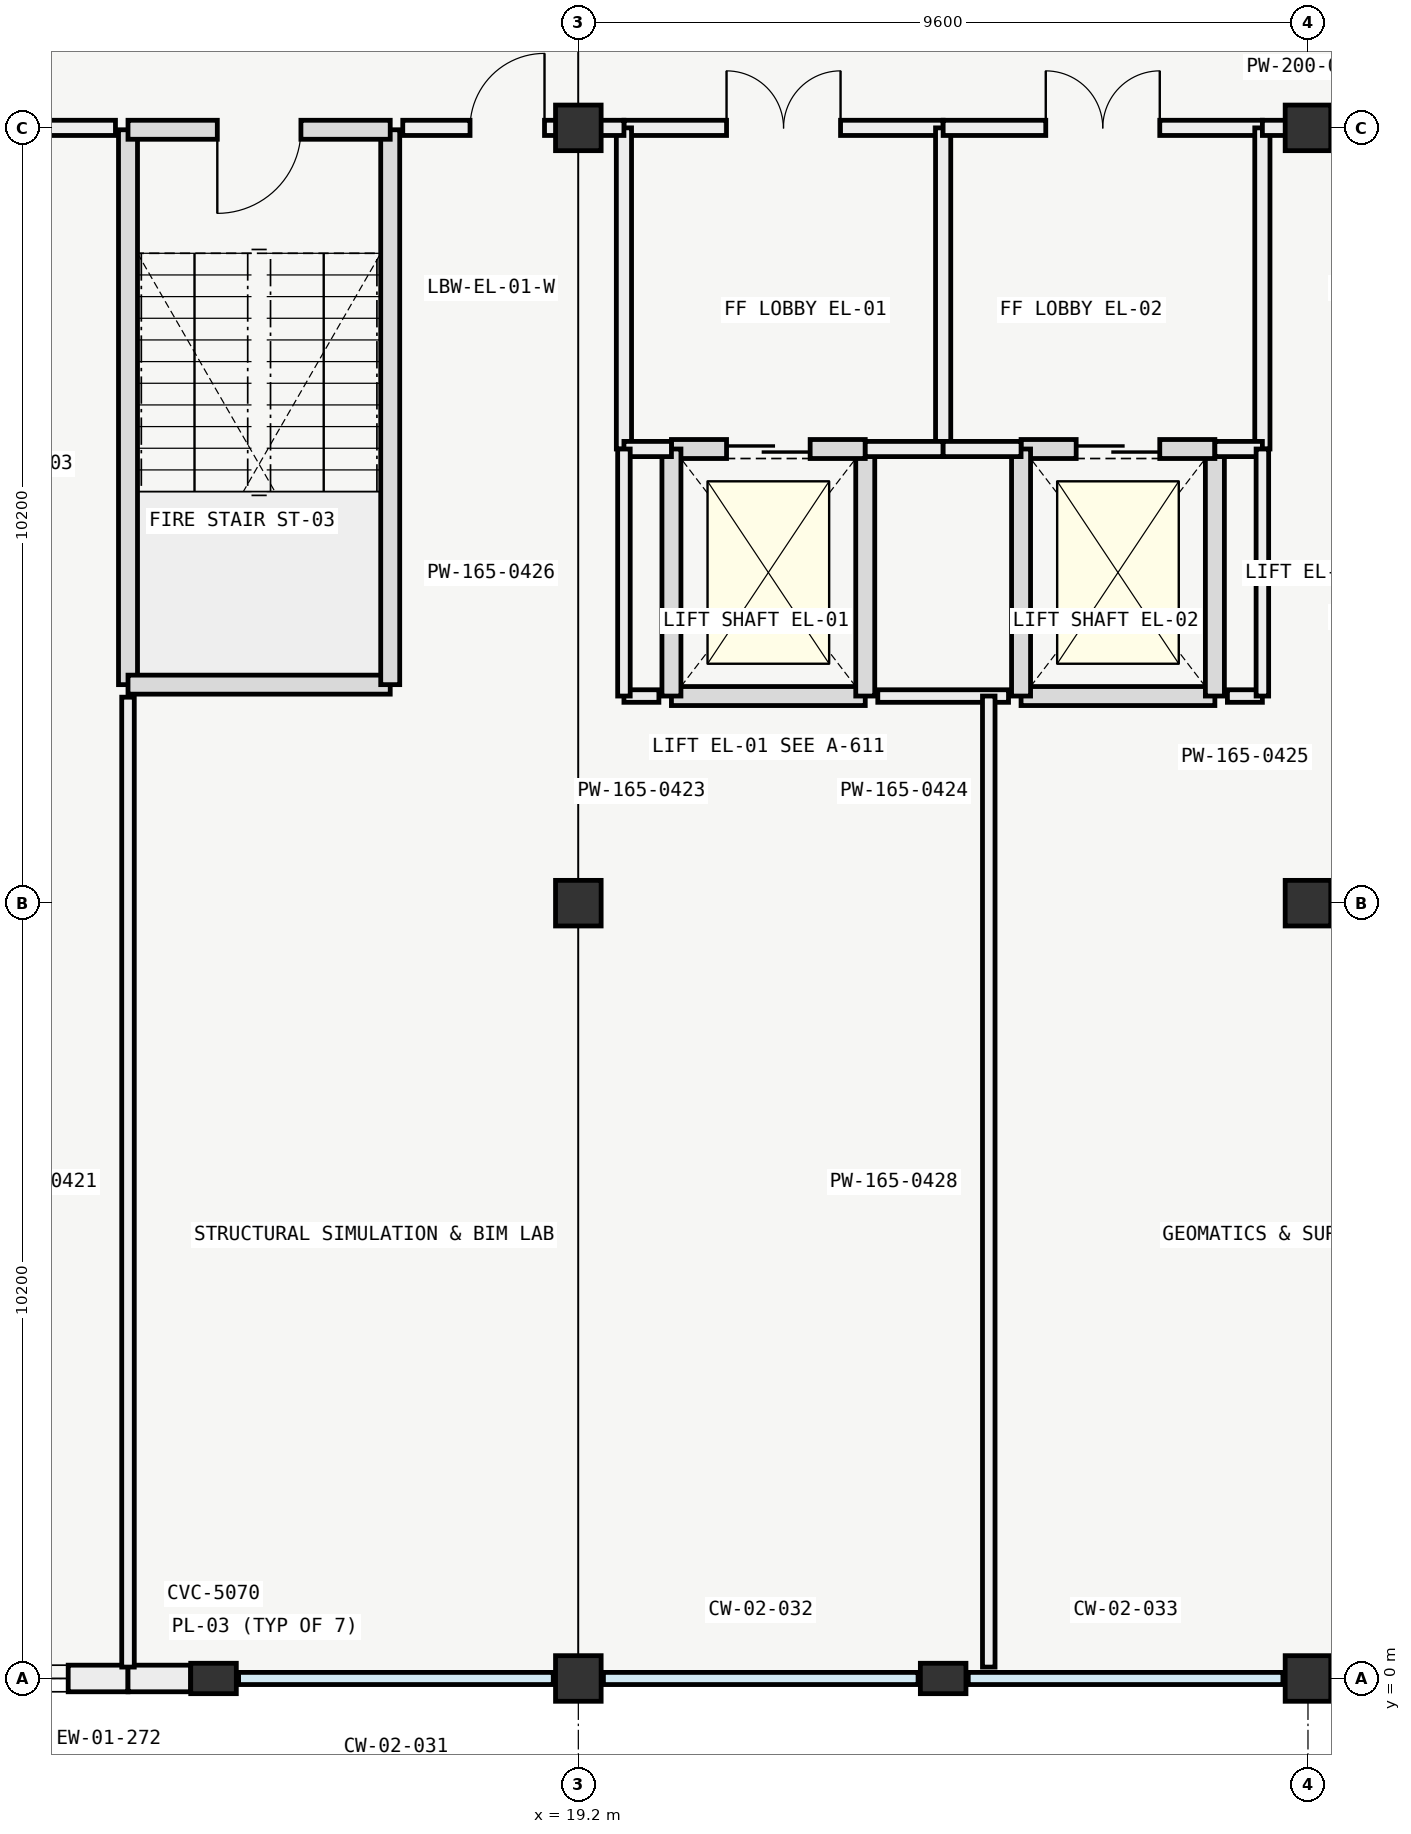
"""IFC4 building model, lengths in metres.
Left out: names, types, materials, properties, quantities, classifications, styles, units other than length and angle.
Written with IfcOpenShell. Run it as: python <this file> out.ifc"""

import sys

from ifc_helpers import new_model, si_unit, direction, frame, frame_2d, origin, origin_2d, place, context, subcontext, project, spatial, rectangle, extrude, element, fill, save


model = new_model("IFC4")
c1 = context("Model", 3, precision=1e-05, world=origin(), true_north=direction((0.0, 1.0)))
c2 = subcontext(c1, "Body", "Model", "MODEL_VIEW")
j1 = project(units=[si_unit("LENGTHUNIT", "METRE"), si_unit("PLANEANGLEUNIT", "RADIAN")], contexts=[c1])
p1 = place(None, origin())
s1 = spatial("IfcSite", under=j1, at=p1, CompositionType="ELEMENT")
p2 = place(p1, origin())
s2 = spatial("IfcBuilding", under=s1, at=p2, CompositionType="ELEMENT")
p3 = place(p2, frame((0.0, 0.0, 18.0)))
s3 = spatial("IfcBuildingStorey", under=s2, at=p3, CompositionType="ELEMENT", Elevation=18.0)
for number, where, z_axis, x_axis in (
    (1, (19.2, 0.0, 0.0), (0.0, 0.0, 1.0), (1.0, 0.0, 0.0)),
    (2, (19.2, 10.2, 0.0), (0.0, 0.0, 1.0), (1.0, 0.0, 0.0)),
    (3, (19.2, 20.4, 0.0), (0.0, 0.0, 1.0), (1.0, 0.0, 0.0)),
    (4, (28.8, 0.0, 0.0), (0.0, 0.0, 1.0), (1.0, 0.0, 0.0)),
    (5, (28.8, 10.2, 0.0), (0.0, 0.0, 1.0), (1.0, 0.0, 0.0)),
    (6, (28.8, 20.4, 0.0), (0.0, 0.0, 1.0), (1.0, 0.0, 0.0)),
):
    element("IfcColumn", number, at=place(p3, frame(where, z_axis=z_axis, x_axis=x_axis)), inside=s3, PredefinedType="COLUMN", context=c2, shape_type="SweptSolid", body=[
        extrude(rectangle(XDim=0.6, YDim=0.6, at=origin_2d()), origin(), (0.0, 0.0, 1.0), 4.2),
    ])
for number, where, z_axis, x_axis in (
    (7, (14.4, 0.0, 0.0), (0.0, 0.0, 1.0), (0.0, 1.0, 0.0)),
    (8, (24.0, 0.0, 0.0), (0.0, 0.0, 1.0), (0.0, 1.0, 0.0)),
):
    element("IfcColumn", number, at=place(p3, frame(where, z_axis=z_axis, x_axis=x_axis)), inside=s3, PredefinedType="PILASTER", context=c2, shape_type="SweptSolid", body=[
        extrude(rectangle(XDim=0.4, YDim=0.6, at=origin_2d()), origin(), (0.0, 0.0, 1.0), 4.2),
    ])
p4 = place(p3, frame((13.275, 0.0, 0.0), z_axis=(0.0, 0.0, 1.0), x_axis=(-1.0, 0.0, 0.0)))
e9 = element("IfcWall", 9, at=p4, inside=s3, PredefinedType="SOLIDWALL", context=c2, shape_type="SweptSolid", body=[
    extrude(rectangle(XDim=3.374, YDim=0.35, at=frame_2d((1.687, 0.0))), origin(), (0.0, 0.0, 1.0), 3.25),
])
p5 = place(p4, frame((0.787, 0.0, 0.8)))
e10 = element("IfcOpeningElement", 10, at=p5, cuts=e9, PredefinedType="OPENING", context=c2, shape_type="SweptSolid", body=[
    extrude(rectangle(XDim=1.8, YDim=2.1, at=frame_2d((0.9, 1.05))), frame((0.0, 0.185, 0.0), z_axis=(0.0, -1.0, 0.0), x_axis=(1.0, 0.0, 0.0)), (0.0, 0.0, 1.0), 0.37),
])
p6 = place(p3, frame((14.099, 0.0, 0.0), z_axis=(0.0, 0.0, 1.0), x_axis=(-1.0, 0.0, 0.0)))
e11 = element("IfcWall", 11, at=p6, inside=s3, PredefinedType="SOLIDWALL", context=c2, shape_type="SweptSolid", body=[
    extrude(rectangle(XDim=0.824, YDim=0.35, at=frame_2d((0.412, 0.0))), origin(), (0.0, 0.0, 1.0), 3.25),
])
p7 = place(p3, frame((13.275, 20.375, 0.0), z_axis=(0.0, 0.0, 1.0), x_axis=(0.0, -1.0, 0.0)))
e12 = element("IfcWall", 12, at=p7, inside=s3, PredefinedType="SOLIDWALL", context=c2, shape_type="SweptSolid", body=[
    extrude(rectangle(XDim=7.3, YDim=0.25, at=frame_2d((3.65, 0.0))), origin(), (0.0, 0.0, 1.0), 3.95),
])
p8 = place(p3, frame((13.275, 13.075, 0.0), z_axis=(0.0, 0.0, 1.0), x_axis=(1.0, 0.0, 0.0)))
e13 = element("IfcWall", 13, at=p8, inside=s3, PredefinedType="SOLIDWALL", context=c2, shape_type="SweptSolid", body=[
    extrude(rectangle(XDim=3.45, YDim=0.25, at=frame_2d((1.725, 0.0))), origin(), (0.0, 0.0, 1.0), 3.95),
])
p9 = place(p3, frame((16.725, 13.075, 0.0), z_axis=(0.0, 0.0, 1.0), x_axis=(0.0, 1.0, 0.0)))
e14 = element("IfcWall", 14, at=p9, inside=s3, PredefinedType="SOLIDWALL", context=c2, shape_type="SweptSolid", body=[
    extrude(rectangle(XDim=7.3, YDim=0.25, at=frame_2d((3.65, 0.0))), origin(), (0.0, 0.0, 1.0), 3.95),
])
p10 = place(p3, frame((16.725, 20.375, 0.0), z_axis=(0.0, 0.0, 1.0), x_axis=(-1.0, 0.0, 0.0)))
e15 = element("IfcWall", 15, at=p10, inside=s3, PredefinedType="SOLIDWALL", context=c2, shape_type="SweptSolid", body=[
    extrude(rectangle(XDim=3.45, YDim=0.25, at=frame_2d((1.725, 0.0))), origin(), (0.0, 0.0, 1.0), 3.95),
])
p11 = place(p10, frame((1.175, 0.0, 0.0)))
e16 = element("IfcOpeningElement", 16, at=p11, cuts=e15, PredefinedType="OPENING", context=c2, shape_type="SweptSolid", body=[
    extrude(rectangle(XDim=1.1, YDim=2.2, at=frame_2d((0.55, 1.1))), frame((0.0, 0.135, 0.0), z_axis=(0.0, -1.0, 0.0), x_axis=(1.0, 0.0, 0.0)), (0.0, 0.0, 1.0), 0.27),
])
p12 = place(p3, frame((20.425, 12.925, 0.0), z_axis=(0.0, 0.0, 1.0), x_axis=(1.0, 0.0, 0.0)))
e17 = element("IfcWall", 17, at=p12, inside=s3, PredefinedType="SOLIDWALL", context=c2, shape_type="SweptSolid", body=[
    extrude(rectangle(XDim=2.55, YDim=0.25, at=frame_2d((1.275, 0.0))), origin(), (0.0, 0.0, 1.0), 3.95),
])
p13 = place(p3, frame((22.975, 12.925, 0.0), z_axis=(0.0, 0.0, 1.0), x_axis=(0.0, 1.0, 0.0)))
e18 = element("IfcWall", 18, at=p13, inside=s3, PredefinedType="SOLIDWALL", context=c2, shape_type="SweptSolid", body=[
    extrude(rectangle(XDim=3.25, YDim=0.25, at=frame_2d((1.625, 0.0))), origin(), (0.0, 0.0, 1.0), 3.95),
])
p14 = place(p3, frame((22.975, 16.175, 0.0), z_axis=(0.0, 0.0, 1.0), x_axis=(-1.0, 0.0, 0.0)))
e19 = element("IfcWall", 19, at=p14, inside=s3, PredefinedType="SOLIDWALL", context=c2, shape_type="SweptSolid", body=[
    extrude(rectangle(XDim=2.55, YDim=0.25, at=frame_2d((1.275, 0.0))), origin(), (0.0, 0.0, 1.0), 3.95),
])
p15 = place(p14, frame((0.725, 0.0, 0.0)))
e20 = element("IfcOpeningElement", 20, at=p15, cuts=e19, PredefinedType="OPENING", context=c2, shape_type="SweptSolid", body=[
    extrude(rectangle(XDim=1.1, YDim=2.1, at=frame_2d((0.55, 1.05))), frame((0.0, 0.135, 0.0), z_axis=(0.0, -1.0, 0.0), x_axis=(1.0, 0.0, 0.0)), (0.0, 0.0, 1.0), 0.27),
])
p16 = place(p3, frame((20.425, 16.175, 0.0), z_axis=(0.0, 0.0, 1.0), x_axis=(0.0, -1.0, 0.0)))
e21 = element("IfcWall", 21, at=p16, inside=s3, PredefinedType="SOLIDWALL", context=c2, shape_type="SweptSolid", body=[
    extrude(rectangle(XDim=3.25, YDim=0.25, at=frame_2d((1.625, 0.0))), origin(), (0.0, 0.0, 1.0), 3.95),
])
p17 = place(p3, frame((19.8, 20.4, 0.0), z_axis=(0.0, 0.0, 1.0), x_axis=(1.0, 0.0, 0.0)))
e22 = element("IfcWall", 22, at=p17, inside=s3, PredefinedType="PARTITIONING", context=c2, shape_type="SweptSolid", body=[
    extrude(rectangle(XDim=4.2, YDim=0.2, at=frame_2d((2.1, 0.0))), origin(), (0.0, 0.0, 1.0), 3.33),
])
p18 = place(p17, frame((1.35, 0.0, 0.0)))
e23 = element("IfcOpeningElement", 23, at=p18, cuts=e22, PredefinedType="OPENING", context=c2, shape_type="SweptSolid", body=[
    extrude(rectangle(XDim=1.5, YDim=2.2, at=frame_2d((0.75, 1.1))), frame((0.0, 0.11, 0.0), z_axis=(0.0, -1.0, 0.0), x_axis=(1.0, 0.0, 0.0)), (0.0, 0.0, 1.0), 0.22),
])
for number, where, z_axis, x_axis in (
    (24, (19.8, 16.175, 0.0), (0.0, 0.0, 1.0), (0.0, 1.0, 0.0)),
    (25, (24.0, 16.175, 0.0), (0.0, 0.0, 1.0), (0.0, 1.0, 0.0)),
):
    element("IfcWall", number, at=place(p3, frame(where, z_axis=z_axis, x_axis=x_axis)), inside=s3, PredefinedType="PARTITIONING", context=c2, shape_type="SweptSolid", body=[
        extrude(rectangle(XDim=4.225, YDim=0.2, at=frame_2d((2.112, 0.0))), origin(), (0.0, 0.0, 1.0), 3.33),
    ])
p19 = place(p3, frame((19.8, 16.175, 0.0), z_axis=(0.0, 0.0, 1.0), x_axis=(1.0, 0.0, 0.0)))
e26 = element("IfcWall", 26, at=p19, inside=s3, PredefinedType="PARTITIONING", context=c2, shape_type="SweptSolid", body=[
    extrude(rectangle(XDim=0.625, YDim=0.2, at=frame_2d((0.312, 0.0))), origin(), (0.0, 0.0, 1.0), 3.55),
])
p20 = place(p3, frame((22.975, 16.175, 0.0), z_axis=(0.0, 0.0, 1.0), x_axis=(1.0, 0.0, 0.0)))
e27 = element("IfcWall", 27, at=p20, inside=s3, PredefinedType="PARTITIONING", context=c2, shape_type="SweptSolid", body=[
    extrude(rectangle(XDim=1.025, YDim=0.2, at=frame_2d((0.512, 0.0))), origin(), (0.0, 0.0, 1.0), 3.55),
])
p21 = place(p3, frame((25.025, 12.925, 0.0), z_axis=(0.0, 0.0, 1.0), x_axis=(1.0, 0.0, 0.0)))
e28 = element("IfcWall", 28, at=p21, inside=s3, PredefinedType="SOLIDWALL", context=c2, shape_type="SweptSolid", body=[
    extrude(rectangle(XDim=2.55, YDim=0.25, at=frame_2d((1.275, 0.0))), origin(), (0.0, 0.0, 1.0), 3.95),
])
p22 = place(p3, frame((27.575, 12.925, 0.0), z_axis=(0.0, 0.0, 1.0), x_axis=(0.0, 1.0, 0.0)))
e29 = element("IfcWall", 29, at=p22, inside=s3, PredefinedType="SOLIDWALL", context=c2, shape_type="SweptSolid", body=[
    extrude(rectangle(XDim=3.25, YDim=0.25, at=frame_2d((1.625, 0.0))), origin(), (0.0, 0.0, 1.0), 3.95),
])
p23 = place(p3, frame((27.575, 16.175, 0.0), z_axis=(0.0, 0.0, 1.0), x_axis=(-1.0, 0.0, 0.0)))
e30 = element("IfcWall", 30, at=p23, inside=s3, PredefinedType="SOLIDWALL", context=c2, shape_type="SweptSolid", body=[
    extrude(rectangle(XDim=2.55, YDim=0.25, at=frame_2d((1.275, 0.0))), origin(), (0.0, 0.0, 1.0), 3.95),
])
p24 = place(p23, frame((0.725, 0.0, 0.0)))
e31 = element("IfcOpeningElement", 31, at=p24, cuts=e30, PredefinedType="OPENING", context=c2, shape_type="SweptSolid", body=[
    extrude(rectangle(XDim=1.1, YDim=2.1, at=frame_2d((0.55, 1.05))), frame((0.0, 0.135, 0.0), z_axis=(0.0, -1.0, 0.0), x_axis=(1.0, 0.0, 0.0)), (0.0, 0.0, 1.0), 0.27),
])
p25 = place(p3, frame((25.025, 16.175, 0.0), z_axis=(0.0, 0.0, 1.0), x_axis=(0.0, -1.0, 0.0)))
e32 = element("IfcWall", 32, at=p25, inside=s3, PredefinedType="SOLIDWALL", context=c2, shape_type="SweptSolid", body=[
    extrude(rectangle(XDim=3.25, YDim=0.25, at=frame_2d((1.625, 0.0))), origin(), (0.0, 0.0, 1.0), 3.95),
])
p26 = place(p3, frame((24.0, 20.4, 0.0), z_axis=(0.0, 0.0, 1.0), x_axis=(1.0, 0.0, 0.0)))
e33 = element("IfcWall", 33, at=p26, inside=s3, PredefinedType="PARTITIONING", context=c2, shape_type="SweptSolid", body=[
    extrude(rectangle(XDim=4.2, YDim=0.2, at=frame_2d((2.1, 0.0))), origin(), (0.0, 0.0, 1.0), 3.33),
])
p27 = place(p26, frame((1.35, 0.0, 0.0)))
e34 = element("IfcOpeningElement", 34, at=p27, cuts=e33, PredefinedType="OPENING", context=c2, shape_type="SweptSolid", body=[
    extrude(rectangle(XDim=1.5, YDim=2.2, at=frame_2d((0.75, 1.1))), frame((0.0, 0.11, 0.0), z_axis=(0.0, -1.0, 0.0), x_axis=(1.0, 0.0, 0.0)), (0.0, 0.0, 1.0), 0.22),
])
p28 = place(p3, frame((28.2, 16.175, 0.0), z_axis=(0.0, 0.0, 1.0), x_axis=(0.0, 1.0, 0.0)))
e35 = element("IfcWall", 35, at=p28, inside=s3, PredefinedType="PARTITIONING", context=c2, shape_type="SweptSolid", body=[
    extrude(rectangle(XDim=4.225, YDim=0.2, at=frame_2d((2.112, 0.0))), origin(), (0.0, 0.0, 1.0), 3.33),
])
p29 = place(p3, frame((24.0, 16.175, 0.0), z_axis=(0.0, 0.0, 1.0), x_axis=(1.0, 0.0, 0.0)))
e36 = element("IfcWall", 36, at=p29, inside=s3, PredefinedType="PARTITIONING", context=c2, shape_type="SweptSolid", body=[
    extrude(rectangle(XDim=1.025, YDim=0.2, at=frame_2d((0.512, 0.0))), origin(), (0.0, 0.0, 1.0), 3.55),
])
p30 = place(p3, frame((27.575, 16.175, 0.0), z_axis=(0.0, 0.0, 1.0), x_axis=(1.0, 0.0, 0.0)))
e37 = element("IfcWall", 37, at=p30, inside=s3, PredefinedType="PARTITIONING", context=c2, shape_type="SweptSolid", body=[
    extrude(rectangle(XDim=0.625, YDim=0.2, at=frame_2d((0.312, 0.0))), origin(), (0.0, 0.0, 1.0), 3.55),
])
p31 = place(p3, frame((13.275, 0.15, 0.0), z_axis=(0.0, 0.0, 1.0), x_axis=(0.0, 1.0, 0.0)))
e38 = element("IfcWall", 38, at=p31, inside=s3, PredefinedType="PARTITIONING", context=c2, shape_type="SweptSolid", body=[
    extrude(rectangle(XDim=12.76, YDim=0.165, at=frame_2d((6.38, 0.0))), origin(), (0.0, 0.0, 1.0), 3.33),
])
p32 = place(p3, frame((0.15, 20.4, 0.0), z_axis=(0.0, 0.0, 1.0), x_axis=(1.0, 0.0, 0.0)))
e39 = element("IfcWall", 39, at=p32, inside=s3, PredefinedType="PARTITIONING", context=c2, shape_type="SweptSolid", body=[
    extrude(rectangle(XDim=12.96, YDim=0.2, at=frame_2d((6.48, 0.0))), origin(), (0.0, 0.0, 1.0), 3.28),
])
p33 = place(p32, frame((6.05, 0.0, 0.0)))
e40 = element("IfcOpeningElement", 40, at=p33, cuts=e39, PredefinedType="OPENING", context=c2, shape_type="SweptSolid", body=[
    extrude(rectangle(XDim=1.5, YDim=2.2, at=frame_2d((0.75, 1.1))), frame((0.0, 0.11, 0.0), z_axis=(0.0, -1.0, 0.0), x_axis=(1.0, 0.0, 0.0)), (0.0, 0.0, 1.0), 0.22),
])
p34 = place(p3, frame((19.8, 12.925, 0.0), z_axis=(0.0, 0.0, 1.0), x_axis=(1.0, 0.0, 0.0)))
e41 = element("IfcWall", 41, at=p34, inside=s3, PredefinedType="PARTITIONING", context=c2, shape_type="SweptSolid", body=[
    extrude(rectangle(XDim=0.46, YDim=0.165, at=frame_2d((0.23, 0.0))), origin(), (0.0, 0.0, 1.0), 3.85),
])
p35 = place(p3, frame((23.14, 12.925, 0.0), z_axis=(0.0, 0.0, 1.0), x_axis=(1.0, 0.0, 0.0)))
e42 = element("IfcWall", 42, at=p35, inside=s3, PredefinedType="PARTITIONING", context=c2, shape_type="SweptSolid", body=[
    extrude(rectangle(XDim=1.72, YDim=0.165, at=frame_2d((0.86, 0.0))), origin(), (0.0, 0.0, 1.0), 3.85),
])
p36 = place(p3, frame((27.74, 12.925, 0.0), z_axis=(0.0, 0.0, 1.0), x_axis=(1.0, 0.0, 0.0)))
e43 = element("IfcWall", 43, at=p36, inside=s3, PredefinedType="PARTITIONING", context=c2, shape_type="SweptSolid", body=[
    extrude(rectangle(XDim=0.46, YDim=0.165, at=frame_2d((0.23, 0.0))), origin(), (0.0, 0.0, 1.0), 3.85),
])
p37 = place(p3, frame((19.8, 12.925, 0.0), z_axis=(0.0, 0.0, 1.0), x_axis=(0.0, 1.0, 0.0)))
e44 = element("IfcWall", 44, at=p37, inside=s3, PredefinedType="PARTITIONING", context=c2, shape_type="SweptSolid", body=[
    extrude(rectangle(XDim=3.25, YDim=0.165, at=frame_2d((1.625, 0.0))), origin(), (0.0, 0.0, 1.0), 3.85),
])
p38 = place(p3, frame((16.89, 20.4, 0.0), z_axis=(0.0, 0.0, 1.0), x_axis=(1.0, 0.0, 0.0)))
e45 = element("IfcWall", 45, at=p38, inside=s3, PredefinedType="PARTITIONING", context=c2, shape_type="SweptSolid", body=[
    extrude(rectangle(XDim=2.91, YDim=0.2, at=frame_2d((1.455, 0.0))), origin(), (0.0, 0.0, 1.0), 3.28),
])
p39 = place(p38, frame((0.885, 0.0, 0.0)))
e46 = element("IfcOpeningElement", 46, at=p39, cuts=e45, PredefinedType="OPENING", context=c2, shape_type="SweptSolid", body=[
    extrude(rectangle(XDim=0.98, YDim=2.15, at=frame_2d((0.49, 1.075))), frame((0.0, 0.11, 0.0), z_axis=(0.0, -1.0, 0.0), x_axis=(1.0, 0.0, 0.0)), (0.0, 0.0, 1.0), 0.22),
])
p40 = place(p3, frame((24.6, 0.15, 0.0), z_axis=(0.0, 0.0, 1.0), x_axis=(0.0, 1.0, 0.0)))
e47 = element("IfcWall", 47, at=p40, inside=s3, PredefinedType="PARTITIONING", context=c2, shape_type="SweptSolid", body=[
    extrude(rectangle(XDim=12.775, YDim=0.165, at=frame_2d((6.388, 0.0))), origin(), (0.0, 0.0, 1.0), 3.33),
])
p41 = place(p3, frame((28.2, 12.925, 0.0), z_axis=(0.0, 0.0, 1.0), x_axis=(0.0, 1.0, 0.0)))
e48 = element("IfcWall", 48, at=p41, inside=s3, PredefinedType="PARTITIONING", context=c2, shape_type="SweptSolid", body=[
    extrude(rectangle(XDim=3.25, YDim=0.165, at=frame_2d((1.625, 0.0))), origin(), (0.0, 0.0, 1.0), 3.85),
])
p42 = place(p3, frame((28.2, 20.4, 0.0), z_axis=(0.0, 0.0, 1.0), x_axis=(1.0, 0.0, 0.0)))
e49 = element("IfcWall", 49, at=p42, inside=s3, PredefinedType="PARTITIONING", context=c2, shape_type="SweptSolid", body=[
    extrude(rectangle(XDim=3.11, YDim=0.2, at=frame_2d((1.555, 0.0))), origin(), (0.0, 0.0, 1.0), 3.28),
])
p43 = place(p42, frame((1.97, 0.0, 0.0)))
e50 = element("IfcOpeningElement", 50, at=p43, cuts=e49, PredefinedType="OPENING", context=c2, shape_type="SweptSolid", body=[
    extrude(rectangle(XDim=0.98, YDim=2.15, at=frame_2d((0.49, 1.075))), frame((0.0, 0.11, 0.0), z_axis=(0.0, -1.0, 0.0), x_axis=(1.0, 0.0, 0.0)), (0.0, 0.0, 1.0), 0.22),
])
p44 = place(p5, origin())
e51 = element("IfcWindow", 51, at=p44, inside=s3, PartitioningType="SINGLE_PANEL", PredefinedType="WINDOW", context=c2, shape_type="SweptSolid", body=[
    extrude(rectangle(XDim=1.8, YDim=2.1, at=frame_2d((0.9, 1.05))), frame((0.0, 0.03, 0.0), z_axis=(0.0, -1.0, 0.0), x_axis=(1.0, 0.0, 0.0)), (0.0, 0.0, 1.0), 0.06),
])
fill(e10, e51)
p45 = place(p11, origin())
e52 = element("IfcDoor", 52, at=p45, inside=s3, OperationType="SINGLE_SWING_RIGHT", PredefinedType="DOOR", context=c2, shape_type="SweptSolid", body=[
    extrude(rectangle(XDim=1.1, YDim=2.2, at=frame_2d((0.55, 1.1))), frame((0.0, 0.025, 0.0), z_axis=(0.0, -1.0, 0.0), x_axis=(1.0, 0.0, 0.0)), (0.0, 0.0, 1.0), 0.05),
])
fill(e16, e52)
p46 = place(p15, origin())
e53 = element("IfcDoor", 53, at=p46, inside=s3, OperationType="SLIDING_TO_LEFT", PredefinedType="DOOR", context=c2, shape_type="SweptSolid", body=[
    extrude(rectangle(XDim=1.1, YDim=2.1, at=frame_2d((0.55, 1.05))), frame((0.0, 0.025, 0.0), z_axis=(0.0, -1.0, 0.0), x_axis=(1.0, 0.0, 0.0)), (0.0, 0.0, 1.0), 0.05),
])
fill(e20, e53)
p47 = place(p18, origin())
e54 = element("IfcDoor", 54, at=p47, inside=s3, OperationType="SINGLE_SWING_LEFT", PredefinedType="DOOR", context=c2, shape_type="SweptSolid", body=[
    extrude(rectangle(XDim=1.5, YDim=2.2, at=frame_2d((0.75, 1.1))), frame((0.0, 0.025, 0.0), z_axis=(0.0, -1.0, 0.0), x_axis=(1.0, 0.0, 0.0)), (0.0, 0.0, 1.0), 0.05),
])
fill(e23, e54)
p48 = place(p24, origin())
e55 = element("IfcDoor", 55, at=p48, inside=s3, OperationType="SLIDING_TO_LEFT", PredefinedType="DOOR", context=c2, shape_type="SweptSolid", body=[
    extrude(rectangle(XDim=1.1, YDim=2.1, at=frame_2d((0.55, 1.05))), frame((0.0, 0.025, 0.0), z_axis=(0.0, -1.0, 0.0), x_axis=(1.0, 0.0, 0.0)), (0.0, 0.0, 1.0), 0.05),
])
fill(e31, e55)
p49 = place(p27, origin())
e56 = element("IfcDoor", 56, at=p49, inside=s3, OperationType="SINGLE_SWING_LEFT", PredefinedType="DOOR", context=c2, shape_type="SweptSolid", body=[
    extrude(rectangle(XDim=1.5, YDim=2.2, at=frame_2d((0.75, 1.1))), frame((0.0, 0.025, 0.0), z_axis=(0.0, -1.0, 0.0), x_axis=(1.0, 0.0, 0.0)), (0.0, 0.0, 1.0), 0.05),
])
fill(e34, e56)
p50 = place(p39, origin())
e57 = element("IfcDoor", 57, at=p50, inside=s3, OperationType="SINGLE_SWING_RIGHT", PredefinedType="DOOR", context=c2, shape_type="SweptSolid", body=[
    extrude(rectangle(XDim=0.98, YDim=2.15, at=frame_2d((0.49, 1.075))), frame((0.0, 0.025, 0.0), z_axis=(0.0, -1.0, 0.0), x_axis=(1.0, 0.0, 0.0)), (0.0, 0.0, 1.0), 0.05),
])
fill(e46, e57)
save(model, sys.argv[1])
